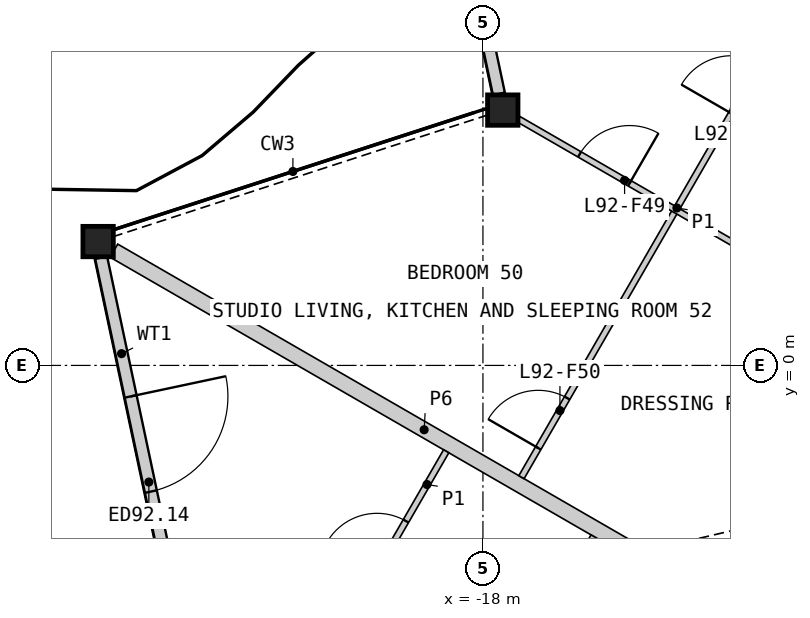
"""IFC4 building model, lengths in metres.
Left out: names, types, materials, properties, quantities, classifications, styles, units other than length and angle.
Written with IfcOpenShell. Run it as: python <this file> out.ifc"""

import sys

from ifc_helpers import new_model, si_unit, direction, frame, frame_2d, origin, origin_2d, place, context, subcontext, project, spatial, rectangle, hollow_rectangle, extrude, element, fill, save


model = new_model("IFC4")
c1 = context("Model", 3, precision=1e-05, world=origin(), true_north=direction((0.0, 1.0)))
c2 = subcontext(c1, "Body", "Model", "MODEL_VIEW")
j1 = project(units=[si_unit("LENGTHUNIT", "METRE"), si_unit("PLANEANGLEUNIT", "RADIAN")], contexts=[c1])
p1 = place(None, origin())
s1 = spatial("IfcSite", under=j1, at=p1, CompositionType="ELEMENT")
p2 = place(p1, origin())
s2 = spatial("IfcBuilding", under=s1, at=p2, CompositionType="ELEMENT")
p3 = place(p2, frame((0.0, 0.0, 401.8)))
s3 = spatial("IfcBuildingStorey", under=s2, at=p3, CompositionType="ELEMENT", Elevation=401.8)
for number, where, z_axis, x_axis in (
    (1, (-17.674, 4.199, 0.0), (0.0, 0.0, 1.0), (1.0, 0.0, 0.0)),
    (2, (-24.329, 2.037, 0.0), (0.0, 0.0, 1.0), (1.0, 0.0, 0.0)),
):
    element("IfcColumn", number, at=place(p3, frame(where, z_axis=z_axis, x_axis=x_axis)), inside=s3, PredefinedType="COLUMN", context=c2, shape_type="SweptSolid", body=[
        extrude(hollow_rectangle(XDim=0.5, YDim=0.5, WallThickness=0.03, at=origin_2d()), origin(), (0.0, 0.0, 1.0), 3.4),
    ])
p4 = place(p3, frame((-19.079, 10.778, 0.0), z_axis=(0.0, 0.0, 1.0), x_axis=(0.207888166349, -0.978152600718, 0.0)))
e3 = element("IfcWall", 3, at=p4, inside=s3, PredefinedType="SOLIDWALL", context=c2, shape_type="SweptSolid", body=[
    extrude(rectangle(XDim=6.453, YDim=0.2, at=frame_2d((3.227, 0.0))), origin(), (0.0, 0.0, 1.0), 2.634),
])
p5 = place(p4, frame((2.333, 0.0, 0.0)))
e4 = element("IfcOpeningElement", 4, at=p5, cuts=e3, PredefinedType="OPENING", context=c2, shape_type="SweptSolid", body=[
    extrude(rectangle(XDim=1.6, YDim=2.25, at=frame_2d((0.8, 1.125))), frame((0.0, 0.11, 0.0), z_axis=(0.0, -1.0, 0.0), x_axis=(1.0, 0.0, 0.0)), (0.0, 0.0, 1.0), 0.22),
])
p6 = place(p3, frame((-24.279, 1.772, 0.0), z_axis=(0.0, 0.0, 1.0), x_axis=(0.207924363149, -0.978144907061, 0.0)))
e5 = element("IfcWall", 5, at=p6, inside=s3, PredefinedType="SOLIDWALL", context=c2, shape_type="SweptSolid", body=[
    extrude(rectangle(XDim=6.453, YDim=0.2, at=frame_2d((3.227, 0.0))), origin(), (0.0, 0.0, 1.0), 2.634),
])
p7 = place(p6, frame((2.333, 0.0, 0.0)))
e6 = element("IfcOpeningElement", 6, at=p7, cuts=e5, PredefinedType="OPENING", context=c2, shape_type="SweptSolid", body=[
    extrude(rectangle(XDim=1.6, YDim=2.25, at=frame_2d((0.8, 1.125))), frame((0.0, 0.11, 0.0), z_axis=(0.0, -1.0, 0.0), x_axis=(1.0, 0.0, 0.0)), (0.0, 0.0, 1.0), 0.22),
])
p8 = place(p3, frame((-24.069, 1.887, 0.0), z_axis=(0.0, 0.0, 1.0), x_axis=(0.866023404247, -0.500003463284, 0.0)))
e7 = element("IfcWall", 7, at=p8, inside=s3, PredefinedType="PARTITIONING", context=c2, shape_type="SweptSolid", body=[
    extrude(rectangle(XDim=11.782, YDim=0.25, at=frame_2d((5.891, 0.0))), origin(), (0.0, 0.0, 1.0), 2.33),
])
p9 = place(p3, frame((-15.131, -6.397, 0.0), z_axis=(0.0, 0.0, 1.0), x_axis=(0.499986217557, 0.866033360935, 0.0)))
e8 = element("IfcWall", 8, at=p9, inside=s3, PredefinedType="PARTITIONING", context=c2, shape_type="SweptSolid", body=[
    extrude(rectangle(XDim=4.3, YDim=0.2, at=frame_2d((2.15, 0.0))), origin(), (0.0, 0.0, 1.0), 3.1),
])
p10 = place(p9, frame((0.75, 0.0, 0.0)))
e9 = element("IfcOpeningElement", 9, at=p10, cuts=e8, PredefinedType="OPENING", context=c2, shape_type="SweptSolid", body=[
    extrude(rectangle(XDim=1.0, YDim=2.1, at=frame_2d((0.5, 1.05))), frame((0.0, 0.11, 0.0), z_axis=(0.0, -1.0, 0.0), x_axis=(1.0, 0.0, 0.0)), (0.0, 0.0, 1.0), 0.22),
])
p11 = place(p3, frame((-18.869, 10.894, 0.0), z_axis=(0.0, 0.0, 1.0), x_axis=(0.866023724155, -0.500002909193, 0.0)))
e10 = element("IfcWall", 10, at=p11, inside=s3, PredefinedType="PARTITIONING", context=c2, shape_type="SweptSolid", body=[
    extrude(rectangle(XDim=11.655, YDim=0.1, at=frame_2d((5.827, 0.0))), origin(), (0.0, 0.0, 1.0), 2.33),
])
p12 = place(p11, frame((6.453, 0.0, 0.0)))
e11 = element("IfcOpeningElement", 11, at=p12, cuts=e10, PredefinedType="OPENING", context=c2, shape_type="SweptSolid", body=[
    extrude(rectangle(XDim=0.95, YDim=2.1, at=frame_2d((0.475, 1.05))), frame((0.0, 0.06, 0.0), z_axis=(0.0, -1.0, 0.0), x_axis=(1.0, 0.0, 0.0)), (0.0, 0.0, 1.0), 0.12),
])
p13 = place(p3, frame((-17.366, -1.838, 0.0), z_axis=(0.0, 0.0, 1.0), x_axis=(0.499998717582, 0.866026144187, 0.0)))
e12 = element("IfcWall", 12, at=p13, inside=s3, PredefinedType="PARTITIONING", context=c2, shape_type="SweptSolid", body=[
    extrude(rectangle(XDim=10.225, YDim=0.1, at=frame_2d((5.113, 0.0))), origin(), (0.0, 0.0, 1.0), 2.33),
])
p14 = place(p13, frame((6.907, 0.0, 0.0)))
e13 = element("IfcOpeningElement", 13, at=p14, cuts=e12, PredefinedType="OPENING", context=c2, shape_type="SweptSolid", body=[
    extrude(rectangle(XDim=0.95, YDim=2.1, at=frame_2d((0.475, 1.05))), frame((0.0, 0.06, 0.0), z_axis=(0.0, -1.0, 0.0), x_axis=(1.0, 0.0, 0.0)), (0.0, 0.0, 1.0), 0.12),
])
p15 = place(p13, frame((0.552, 0.0, 0.0)))
e14 = element("IfcOpeningElement", 14, at=p15, cuts=e12, PredefinedType="OPENING", context=c2, shape_type="SweptSolid", body=[
    extrude(rectangle(XDim=0.95, YDim=2.1, at=frame_2d((0.475, 1.05))), frame((0.0, 0.06, 0.0), z_axis=(0.0, -1.0, 0.0), x_axis=(1.0, 0.0, 0.0)), (0.0, 0.0, 1.0), 0.12),
])
p16 = place(p3, frame((-17.414, 4.049, 0.0), z_axis=(0.0, 0.0, 1.0), x_axis=(0.866033839264, -0.499985389037, 0.0)))
e15 = element("IfcWall", 15, at=p16, inside=s3, PredefinedType="PARTITIONING", context=c2, shape_type="SweptSolid", body=[
    extrude(rectangle(XDim=7.1, YDim=0.1, at=frame_2d((3.55, 0.0))), origin(), (0.0, 0.0, 1.0), 2.33),
])
p17 = place(p16, frame((1.158, 0.0, 0.0)))
e16 = element("IfcOpeningElement", 16, at=p17, cuts=e15, PredefinedType="OPENING", context=c2, shape_type="SweptSolid", body=[
    extrude(rectangle(XDim=0.95, YDim=2.1, at=frame_2d((0.475, 1.05))), frame((0.0, 0.06, 0.0), z_axis=(0.0, -1.0, 0.0), x_axis=(1.0, 0.0, 0.0)), (0.0, 0.0, 1.0), 0.12),
])
p18 = place(p3, frame((-17.442, -4.999, 0.0), z_axis=(0.0, 0.0, 1.0), x_axis=(0.499976333282, 0.866039067339, 0.0)))
e17 = element("IfcWall", 17, at=p18, inside=s3, PredefinedType="PARTITIONING", context=c2, shape_type="SweptSolid", body=[
    extrude(rectangle(XDim=2.525, YDim=0.1, at=frame_2d((1.262, 0.0))), origin(), (0.0, 0.0, 1.0), 2.33),
])
p19 = place(p3, frame((-19.867, -3.599, 0.0), z_axis=(0.0, 0.0, 1.0), x_axis=(0.500048846702, 0.865997200291, 0.0)))
e18 = element("IfcWall", 18, at=p19, inside=s3, PredefinedType="PARTITIONING", context=c2, shape_type="SweptSolid", body=[
    extrude(rectangle(XDim=2.525, YDim=0.1, at=frame_2d((1.263, 0.0))), origin(), (0.0, 0.0, 1.0), 2.33),
])
p20 = place(p19, frame((0.25, 0.0, 0.0)))
e19 = element("IfcOpeningElement", 19, at=p20, cuts=e18, PredefinedType="OPENING", context=c2, shape_type="SweptSolid", body=[
    extrude(rectangle(XDim=0.95, YDim=2.1, at=frame_2d((0.475, 1.05))), frame((0.0, 0.06, 0.0), z_axis=(0.0, -1.0, 0.0), x_axis=(1.0, 0.0, 0.0)), (0.0, 0.0, 1.0), 0.12),
])
p21 = place(p7, origin())
e20 = element("IfcDoor", 20, at=p21, inside=s3, OperationType="DOUBLE_DOOR_SINGLE_SWING", PredefinedType="DOOR", context=c2, shape_type="SweptSolid", body=[
    extrude(rectangle(XDim=1.6, YDim=2.25, at=frame_2d((0.8, 1.125))), frame((0.0, 0.025, 0.0), z_axis=(0.0, -1.0, 0.0), x_axis=(1.0, 0.0, 0.0)), (0.0, 0.0, 1.0), 0.05),
])
fill(e6, e20)
p22 = place(p14, origin())
e21 = element("IfcDoor", 21, at=p22, inside=s3, OperationType="SINGLE_SWING_LEFT", PredefinedType="DOOR", context=c2, shape_type="SweptSolid", body=[
    extrude(rectangle(XDim=0.95, YDim=2.1, at=frame_2d((0.475, 1.05))), frame((0.0, 0.025, 0.0), z_axis=(0.0, -1.0, 0.0), x_axis=(1.0, 0.0, 0.0)), (0.0, 0.0, 1.0), 0.05),
])
fill(e13, e21)
p23 = place(p17, origin())
e22 = element("IfcDoor", 22, at=p23, inside=s3, OperationType="SINGLE_SWING_RIGHT", PredefinedType="DOOR", context=c2, shape_type="SweptSolid", body=[
    extrude(rectangle(XDim=0.95, YDim=2.1, at=frame_2d((0.475, 1.05))), frame((0.0, 0.025, 0.0), z_axis=(0.0, -1.0, 0.0), x_axis=(1.0, 0.0, 0.0)), (0.0, 0.0, 1.0), 0.05),
])
fill(e16, e22)
p24 = place(p15, origin())
e23 = element("IfcDoor", 23, at=p24, inside=s3, OperationType="SINGLE_SWING_LEFT", PredefinedType="DOOR", context=c2, shape_type="SweptSolid", body=[
    extrude(rectangle(XDim=0.95, YDim=2.1, at=frame_2d((0.475, 1.05))), frame((0.0, 0.025, 0.0), z_axis=(0.0, -1.0, 0.0), x_axis=(1.0, 0.0, 0.0)), (0.0, 0.0, 1.0), 0.05),
])
fill(e14, e23)
p25 = place(p20, origin())
e24 = element("IfcDoor", 24, at=p25, inside=s3, OperationType="SINGLE_SWING_LEFT", PredefinedType="DOOR", context=c2, shape_type="SweptSolid", body=[
    extrude(rectangle(XDim=0.95, YDim=2.1, at=frame_2d((0.475, 1.05))), frame((0.0, 0.025, 0.0), z_axis=(0.0, -1.0, 0.0), x_axis=(1.0, 0.0, 0.0)), (0.0, 0.0, 1.0), 0.05),
])
fill(e19, e24)
save(model, sys.argv[1])
